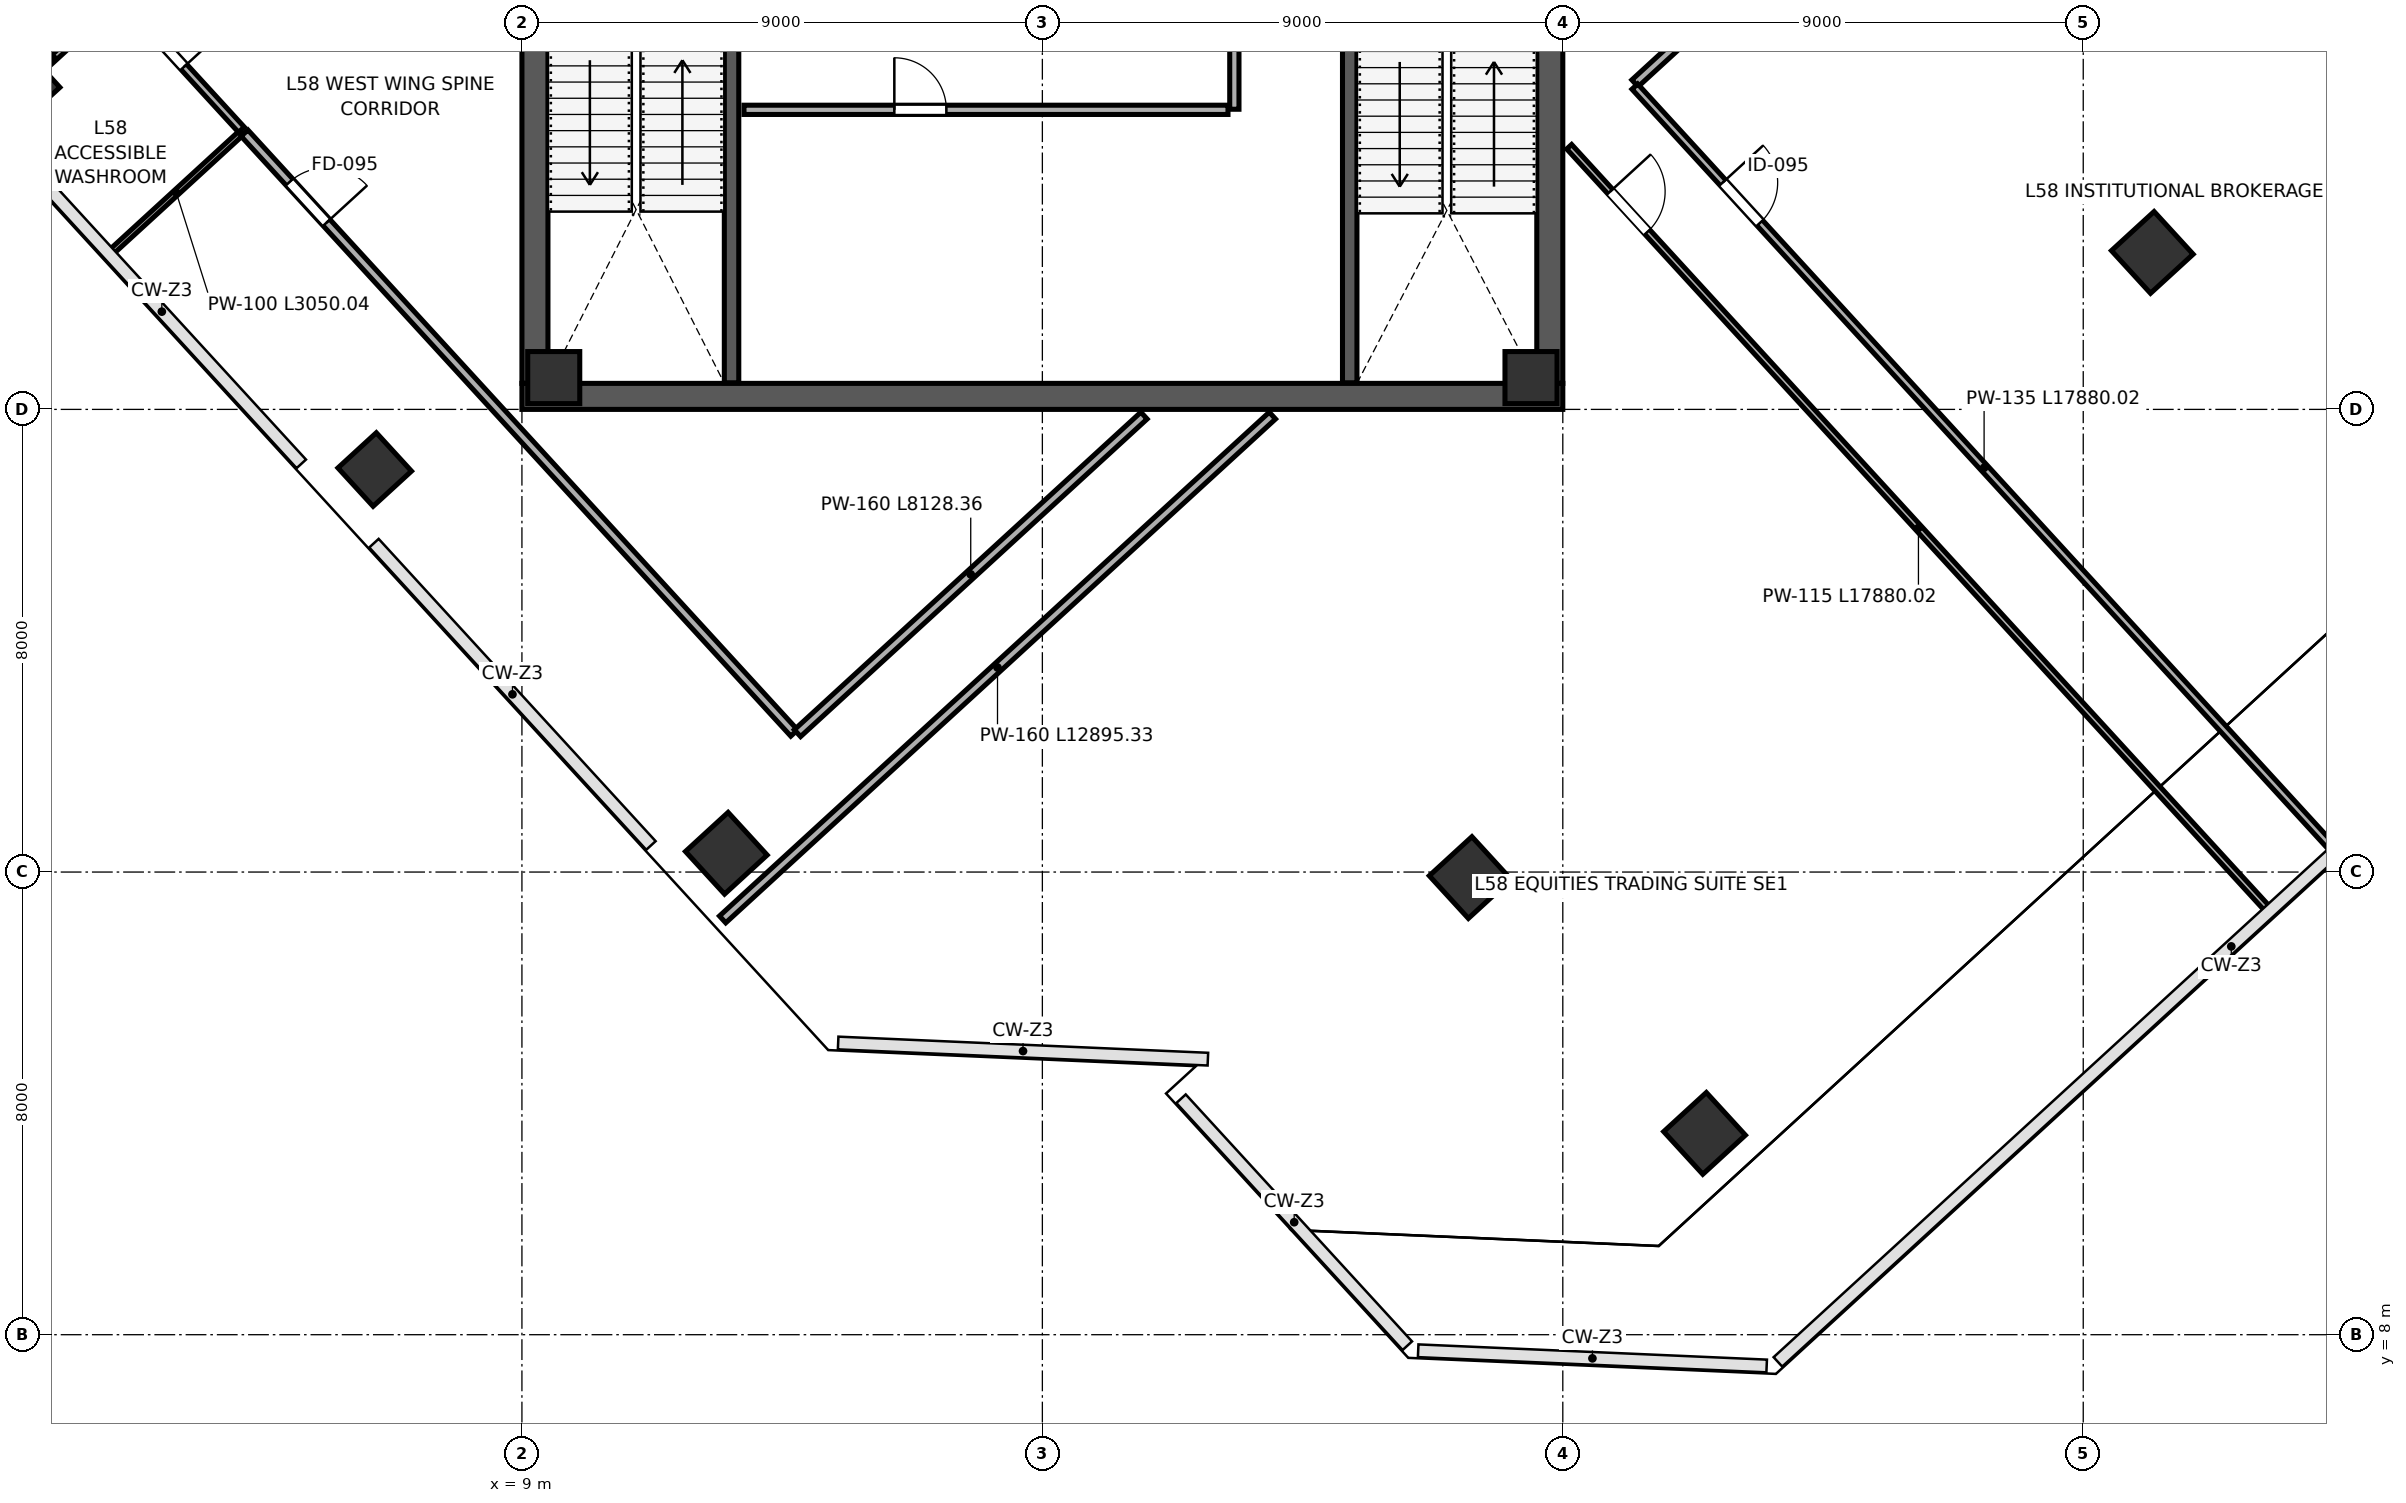
"""IFC4 building model, lengths in metres.
Left out: names, types, materials, properties, quantities, classifications, styles, units other than length and angle.
Written with IfcOpenShell. Run it as: python <this file> out.ifc"""

import sys

from ifc_helpers import new_model, si_unit, direction, frame, frame_2d, origin, origin_2d, place, context, subcontext, project, spatial, rectangle, extrude, source, transform, mapped, element, fill, save


model = new_model("IFC4")
c1 = context("Model", 3, precision=1e-05, world=origin(), true_north=direction((0.0, 1.0)))
c2 = subcontext(c1, "Body", "Model", "MODEL_VIEW")
j1 = project(units=[si_unit("LENGTHUNIT", "METRE"), si_unit("PLANEANGLEUNIT", "RADIAN")], contexts=[c1])
p1 = place(None, origin())
s1 = spatial("IfcSite", under=j1, at=p1, CompositionType="ELEMENT")
p2 = place(p1, origin())
s2 = spatial("IfcBuilding", under=s1, at=p2, CompositionType="ELEMENT")
p3 = place(p2, frame((0.0, 0.0, 258.4)))
s3 = spatial("IfcBuildingStorey", under=s2, at=p3, CompositionType="ELEMENT", Elevation=258.4)
m1 = source(origin(), c2, "Body", "SweptSolid", [
    extrude(rectangle(XDim=0.9, YDim=0.9, at=origin_2d()), origin(), (0.0, 0.0, 1.0), 4.199),
])
for number, where, z_axis, x_axis in (
    (1, (9.55, 24.55, 0.001), (0.0, 0.0, 1.0), (1.0, 0.0, 0.0)),
    (2, (26.45, 24.55, 0.001), (0.0, 0.0, 1.0), (1.0, 0.0, 0.0)),
):
    element("IfcColumn", number, at=place(p3, frame(where, z_axis=z_axis, x_axis=x_axis)), inside=s3, PredefinedType="COLUMN", context=c2, shape_type="MappedRepresentation", body=[
        mapped(m1, transform((0.0, 0.0, 0.0), scale=1.0)),
    ])
m2 = source(origin(), c2, "Body", "SweptSolid", [
    extrude(rectangle(XDim=0.9, YDim=0.9, at=origin_2d()), origin(), (0.0, 0.0, 1.0), 4.199),
])
for number, where, z_axis, x_axis in (
    (3, (0.374, 29.596, 0.001), (0.0, 0.0, 1.0), (-0.676, 0.737, 0.0)),
    (4, (6.454, 22.96, 0.001), (0.0, 0.0, 1.0), (-0.676, 0.737, 0.0)),
):
    element("IfcColumn", number, at=place(p3, frame(where, z_axis=z_axis, x_axis=x_axis)), inside=s3, PredefinedType="COLUMN", context=c2, shape_type="MappedRepresentation", body=[
        mapped(m2, transform((0.0, 0.0, 0.0), scale=1.0)),
    ])
m3 = source(origin(), c2, "Body", "SweptSolid", [
    extrude(rectangle(XDim=1.0, YDim=1.0, at=origin_2d()), origin(), (0.0, 0.0, 1.0), 4.199),
])
p4 = place(p3, frame((12.535, 16.325, 0.001), z_axis=(0.0, 0.0, 1.0), x_axis=(-0.675590207616, 0.73727733681, 0.0)))
e5 = element("IfcColumn", 5, at=p4, inside=s3, PredefinedType="COLUMN", context=c2, shape_type="MappedRepresentation", body=[
    mapped(m3, transform((0.0, 0.0, 0.0), scale=1.0)),
])
m4 = source(origin(), c2, "Body", "SweptSolid", [
    extrude(rectangle(XDim=1.0, YDim=1.0, at=origin_2d()), origin(), (0.0, 0.0, 1.0), 4.199),
])
for number, where, z_axis, x_axis in (
    (6, (25.398, 15.905, 0.001), (0.0, 0.0, 1.0), (-0.676, 0.737, 0.0)),
    (7, (37.194, 26.714, 0.001), (0.0, 0.0, 1.0), (-0.676, 0.737, 0.0)),
):
    element("IfcColumn", number, at=place(p3, frame(where, z_axis=z_axis, x_axis=x_axis)), inside=s3, PredefinedType="COLUMN", context=c2, shape_type="MappedRepresentation", body=[
        mapped(m4, transform((0.0, 0.0, 0.0), scale=1.0)),
    ])
p5 = place(p3, frame((29.451, 11.481, 0.001), z_axis=(0.0, 0.0, 1.0), x_axis=(-0.675590207616, 0.73727733681, 0.0)))
e8 = element("IfcColumn", 8, at=p5, inside=s3, PredefinedType="COLUMN", context=c2, shape_type="MappedRepresentation", body=[
    mapped(m3, transform((0.0, 0.0, 0.0), scale=1.0)),
])
p6 = place(p3, frame((9.225, 24.45, 0.0), z_axis=(0.0, 0.0, 1.0), x_axis=(0.0, 1.0, 0.0)))
e9 = element("IfcWall", 9, at=p6, inside=s3, PredefinedType="SHEAR", context=c2, shape_type="SweptSolid", body=[
    extrude(rectangle(XDim=15.1, YDim=0.45, at=frame_2d((7.55, 0.0))), origin(), (0.0, 0.0, 1.0), 3.96),
])
p7 = place(p6, frame((8.7, 0.0, 0.0)))
e10 = element("IfcOpeningElement", 10, at=p7, cuts=e9, PredefinedType="OPENING", context=c2, shape_type="SweptSolid", body=[
    extrude(rectangle(XDim=1.15, YDim=2.2, at=frame_2d((0.575, 1.1))), frame((0.0, 0.235, 0.0), z_axis=(0.0, -1.0, 0.0), x_axis=(1.0, 0.0, 0.0)), (0.0, 0.0, 1.0), 0.47),
])
p8 = place(p3, frame((26.775, 24.45, 0.0), z_axis=(0.0, 0.0, 1.0), x_axis=(0.0, 1.0, 0.0)))
e11 = element("IfcWall", 11, at=p8, inside=s3, PredefinedType="SHEAR", context=c2, shape_type="SweptSolid", body=[
    extrude(rectangle(XDim=15.1, YDim=0.45, at=frame_2d((7.55, 0.0))), origin(), (0.0, 0.0, 1.0), 3.96),
])
p9 = place(p8, frame((8.6, 0.0, 0.0)))
e12 = element("IfcOpeningElement", 12, at=p9, cuts=e11, PredefinedType="OPENING", context=c2, shape_type="SweptSolid", body=[
    extrude(rectangle(XDim=1.15, YDim=2.2, at=frame_2d((0.575, 1.1))), frame((0.0, 0.235, 0.0), z_axis=(0.0, -1.0, 0.0), x_axis=(1.0, 0.0, 0.0)), (0.0, 0.0, 1.0), 0.47),
])
p10 = place(p3, frame((9.0, 24.225, 0.0), z_axis=(0.0, 0.0, 1.0), x_axis=(1.0, 0.0, 0.0)))
e13 = element("IfcWall", 13, at=p10, inside=s3, PredefinedType="SHEAR", context=c2, shape_type="SweptSolid", body=[
    extrude(rectangle(XDim=18.0, YDim=0.45, at=frame_2d((9.0, 0.0))), origin(), (0.0, 0.0, 1.0), 3.96),
])
p11 = place(p3, frame((12.625, 24.46, 0.0), z_axis=(0.0, 0.0, 1.0), x_axis=(0.0, 1.0, 0.0)))
e14 = element("IfcWall", 14, at=p11, inside=s3, PredefinedType="SHEAR", context=c2, shape_type="SweptSolid", body=[
    extrude(rectangle(XDim=7.49, YDim=0.25, at=frame_2d((3.745, 0.0))), origin(), (0.0, 0.0, 1.0), 3.96),
])
p12 = place(p11, frame((5.85, 0.0, 0.0)))
e15 = element("IfcOpeningElement", 15, at=p12, cuts=e14, PredefinedType="OPENING", context=c2, shape_type="SweptSolid", body=[
    extrude(rectangle(XDim=1.15, YDim=2.2, at=frame_2d((0.575, 1.1))), frame((0.0, 0.135, 0.0), z_axis=(0.0, -1.0, 0.0), x_axis=(1.0, 0.0, 0.0)), (0.0, 0.0, 1.0), 0.27),
])
p13 = place(p3, frame((23.315, 24.46, 0.0), z_axis=(0.0, 0.0, 1.0), x_axis=(0.0, 1.0, 0.0)))
e16 = element("IfcWall", 16, at=p13, inside=s3, PredefinedType="SHEAR", context=c2, shape_type="SweptSolid", body=[
    extrude(rectangle(XDim=7.49, YDim=0.25, at=frame_2d((3.745, 0.0))), origin(), (0.0, 0.0, 1.0), 3.96),
])
p14 = place(p3, frame((12.84, 29.18, 0.0), z_axis=(0.0, 0.0, 1.0), x_axis=(1.0, 0.0, 0.0)))
e17 = element("IfcWall", 17, at=p14, inside=s3, PredefinedType="PARTITIONING", context=c2, shape_type="SweptSolid", body=[
    extrude(rectangle(XDim=8.37, YDim=0.16, at=frame_2d((4.185, 0.0))), origin(), (0.0, 0.0, 1.0), 3.96),
])
p15 = place(p14, frame((2.6, 0.0, 0.0)))
e18 = element("IfcOpeningElement", 18, at=p15, cuts=e17, PredefinedType="OPENING", context=c2, shape_type="SweptSolid", body=[
    extrude(rectangle(XDim=0.9, YDim=2.15, at=frame_2d((0.45, 1.075))), frame((0.0, 0.09, 0.0), z_axis=(0.0, -1.0, 0.0), x_axis=(1.0, 0.0, 0.0)), (0.0, 0.0, 1.0), 0.18),
])
p16 = place(p3, frame((21.32, 29.19, 0.0), z_axis=(0.0, 0.0, 1.0), x_axis=(0.0, 1.0, 0.0)))
e19 = element("IfcWall", 19, at=p16, inside=s3, PredefinedType="PARTITIONING", context=c2, shape_type="SweptSolid", body=[
    extrude(rectangle(XDim=2.92, YDim=0.16, at=frame_2d((1.46, 0.0))), origin(), (0.0, 0.0, 1.0), 3.96),
])
p17 = place(p3, frame((-0.231, 29.042, 0.0), z_axis=(0.0, 0.0, 1.0), x_axis=(0.737290351983, 0.675576003772, 0.0)))
e20 = element("IfcWall", 20, at=p17, inside=s3, PredefinedType="PARTITIONING", context=c2, shape_type="SweptSolid", body=[
    extrude(rectangle(XDim=3.05, YDim=0.115, at=frame_2d((1.525, 0.0))), origin(), (0.0, 0.0, 1.0), 3.295),
])
p18 = place(p3, frame((1.897, 26.719, 0.0), z_axis=(0.0, 0.0, 1.0), x_axis=(0.737290351983, 0.675576003772, 0.0)))
e21 = element("IfcWall", 21, at=p18, inside=s3, PredefinedType="PARTITIONING", context=c2, shape_type="SweptSolid", body=[
    extrude(rectangle(XDim=3.05, YDim=0.1, at=frame_2d((1.525, 0.0))), origin(), (0.0, 0.0, 1.0), 3.295),
])
p19 = place(p3, frame((-0.474, 33.881, 0.0), z_axis=(0.0, 0.0, 1.0), x_axis=(0.675605050901, -0.73726373517, 0.0)))
e22 = element("IfcWall", 22, at=p19, inside=s3, PredefinedType="PARTITIONING", context=c2, shape_type="SweptSolid", body=[
    extrude(rectangle(XDim=6.842, YDim=0.135, at=frame_2d((3.421, 0.0))), origin(), (0.0, 0.0, 1.0), 3.96),
])
p20 = place(p19, frame((2.32, 0.0, 0.0)))
e23 = element("IfcOpeningElement", 23, at=p20, cuts=e22, PredefinedType="OPENING", context=c2, shape_type="SweptSolid", body=[
    extrude(rectangle(XDim=0.9, YDim=2.15, at=frame_2d((0.45, 1.075))), frame((0.0, 0.078, 0.0), z_axis=(0.0, -1.0, 0.0), x_axis=(1.0, 0.0, 0.0)), (0.0, 0.0, 1.0), 0.155),
])
p21 = place(p19, frame((4.42, 0.0, 0.0)))
e24 = element("IfcOpeningElement", 24, at=p21, cuts=e22, PredefinedType="OPENING", context=c2, shape_type="SweptSolid", body=[
    extrude(rectangle(XDim=0.95, YDim=2.15, at=frame_2d((0.475, 1.075))), frame((0.0, 0.078, 0.0), z_axis=(0.0, -1.0, 0.0), x_axis=(1.0, 0.0, 0.0)), (0.0, 0.0, 1.0), 0.155),
])
p22 = place(p3, frame((4.203, 28.778, 0.0), z_axis=(0.0, 0.0, 1.0), x_axis=(0.675591041558, -0.737276572642, 0.0)))
e25 = element("IfcWall", 25, at=p22, inside=s3, PredefinedType="PARTITIONING", context=c2, shape_type="SweptSolid", body=[
    extrude(rectangle(XDim=14.07, YDim=0.16, at=frame_2d((7.035, 0.0))), origin(), (0.0, 0.0, 1.0), 3.96),
])
p23 = place(p22, frame((1.15, 0.0, 0.0)))
e26 = element("IfcOpeningElement", 26, at=p23, cuts=e25, PredefinedType="OPENING", context=c2, shape_type="SweptSolid", body=[
    extrude(rectangle(XDim=0.95, YDim=2.15, at=frame_2d((0.475, 1.075))), frame((0.0, 0.09, 0.0), z_axis=(0.0, -1.0, 0.0), x_axis=(1.0, 0.0, 0.0)), (0.0, 0.0, 1.0), 0.18),
])
p24 = place(p3, frame((13.765, 18.402, 0.0), z_axis=(0.0, 0.0, 1.0), x_axis=(0.737266340408, 0.675602207887, 0.0)))
e27 = element("IfcWall", 27, at=p24, inside=s3, PredefinedType="PARTITIONING", context=c2, shape_type="SweptSolid", body=[
    extrude(rectangle(XDim=8.128, YDim=0.16, at=frame_2d((4.064, 0.0))), origin(), (0.0, 0.0, 1.0), 3.96),
])
p25 = place(p3, frame((28.248, 29.639, 0.0), z_axis=(0.0, 0.0, 1.0), x_axis=(0.73728000412, 0.675587296746, 0.0)))
e28 = element("IfcWall", 28, at=p25, inside=s3, PredefinedType="PARTITIONING", context=c2, shape_type="SweptSolid", body=[
    extrude(rectangle(XDim=12.64, YDim=0.16, at=frame_2d((6.32, 0.0))), origin(), (0.0, 0.0, 1.0), 3.295),
])
p26 = place(p3, frame((12.47, 15.181, 0.0), z_axis=(0.0, 0.0, 1.0), x_axis=(0.737265724175, 0.675602880365, 0.0)))
e29 = element("IfcWall", 29, at=p26, inside=s3, PredefinedType="PARTITIONING", context=c2, shape_type="SweptSolid", body=[
    extrude(rectangle(XDim=12.895, YDim=0.16, at=frame_2d((6.448, 0.0))), origin(), (0.0, 0.0, 1.0), 3.96),
])
p27 = place(p3, frame((28.246, 29.582, 0.0), z_axis=(0.0, 0.0, 1.0), x_axis=(0.67559539026, -0.737272587758, 0.0)))
e30 = element("IfcWall", 30, at=p27, inside=s3, PredefinedType="PARTITIONING", context=c2, shape_type="SweptSolid", body=[
    extrude(rectangle(XDim=17.88, YDim=0.135, at=frame_2d((8.94, 0.0))), origin(), (0.0, 0.0, 1.0), 3.253),
])
p28 = place(p27, frame((2.25, 0.0, 0.0)))
e31 = element("IfcOpeningElement", 31, at=p28, cuts=e30, PredefinedType="OPENING", context=c2, shape_type="SweptSolid", body=[
    extrude(rectangle(XDim=0.95, YDim=2.15, at=frame_2d((0.475, 1.075))), frame((0.0, 0.078, 0.0), z_axis=(0.0, -1.0, 0.0), x_axis=(1.0, 0.0, 0.0)), (0.0, 0.0, 1.0), 0.155),
])
p29 = place(p3, frame((27.11, 28.542, 0.0), z_axis=(0.0, 0.0, 1.0), x_axis=(0.675588589041, -0.737278819957, 0.0)))
e32 = element("IfcWall", 32, at=p29, inside=s3, PredefinedType="PARTITIONING", context=c2, shape_type="SweptSolid", body=[
    extrude(rectangle(XDim=17.88, YDim=0.115, at=frame_2d((8.94, 0.0))), origin(), (0.0, 0.0, 1.0), 3.253),
])
p30 = place(p29, frame((1.05, 0.0, 0.0)))
e33 = element("IfcOpeningElement", 33, at=p30, cuts=e32, PredefinedType="OPENING", context=c2, shape_type="SweptSolid", body=[
    extrude(rectangle(XDim=0.95, YDim=2.15, at=frame_2d((0.475, 1.075))), frame((0.0, 0.067, 0.0), z_axis=(0.0, -1.0, 0.0), x_axis=(1.0, 0.0, 0.0)), (0.0, 0.0, 1.0), 0.135),
])
m5 = source(origin(), c2, "Body", "SweptSolid", [
    extrude(rectangle(XDim=0.9, YDim=2.15, at=frame_2d((0.45, 1.075))), frame((0.0, 0.025, 0.0), z_axis=(0.0, -1.0, 0.0), x_axis=(1.0, 0.0, 0.0)), (0.0, 0.0, 1.0), 0.05),
])
p31 = place(p15, origin())
e34 = element("IfcDoor", 34, at=p31, inside=s3, OperationType="SINGLE_SWING_LEFT", PredefinedType="DOOR", context=c2, shape_type="MappedRepresentation", body=[
    mapped(m5, transform((0.0, 0.0, 0.0), scale=1.0)),
])
fill(e18, e34)
m6 = source(origin(), c2, "Body", "SweptSolid", [
    extrude(rectangle(XDim=0.95, YDim=2.15, at=frame_2d((0.475, 1.075))), frame((0.0, 0.025, 0.0), z_axis=(0.0, -1.0, 0.0), x_axis=(1.0, 0.0, 0.0)), (0.0, 0.0, 1.0), 0.05),
])
p32 = place(p21, origin())
e35 = element("IfcDoor", 35, at=p32, inside=s3, OperationType="SINGLE_SWING_RIGHT", PredefinedType="DOOR", context=c2, shape_type="MappedRepresentation", body=[
    mapped(m6, transform((0.0, 0.0, 0.0), scale=1.0)),
])
fill(e24, e35)
m7 = source(origin(), c2, "Body", "SweptSolid", [
    extrude(rectangle(XDim=0.95, YDim=2.15, at=frame_2d((0.475, 1.075))), frame((0.0, 0.025, 0.0), z_axis=(0.0, -1.0, 0.0), x_axis=(1.0, 0.0, 0.0)), (0.0, 0.0, 1.0), 0.05),
])
p33 = place(p23, origin())
e36 = element("IfcDoor", 36, at=p33, inside=s3, OperationType="SINGLE_SWING_RIGHT", PredefinedType="DOOR", context=c2, shape_type="MappedRepresentation", body=[
    mapped(m7, transform((0.0, 0.0, 0.0), scale=1.0)),
])
fill(e26, e36)
p34 = place(p28, origin())
e37 = element("IfcDoor", 37, at=p34, inside=s3, OperationType="SINGLE_SWING_LEFT", PredefinedType="DOOR", context=c2, shape_type="MappedRepresentation", body=[
    mapped(m6, transform((0.0, 0.0, 0.0), scale=1.0)),
])
fill(e31, e37)
p35 = place(p30, origin())
e38 = element("IfcDoor", 38, at=p35, inside=s3, OperationType="SINGLE_SWING_LEFT", PredefinedType="DOOR", context=c2, shape_type="MappedRepresentation", body=[
    mapped(m6, transform((0.0, 0.0, 0.0), scale=1.0)),
])
fill(e33, e38)
save(model, sys.argv[1])
